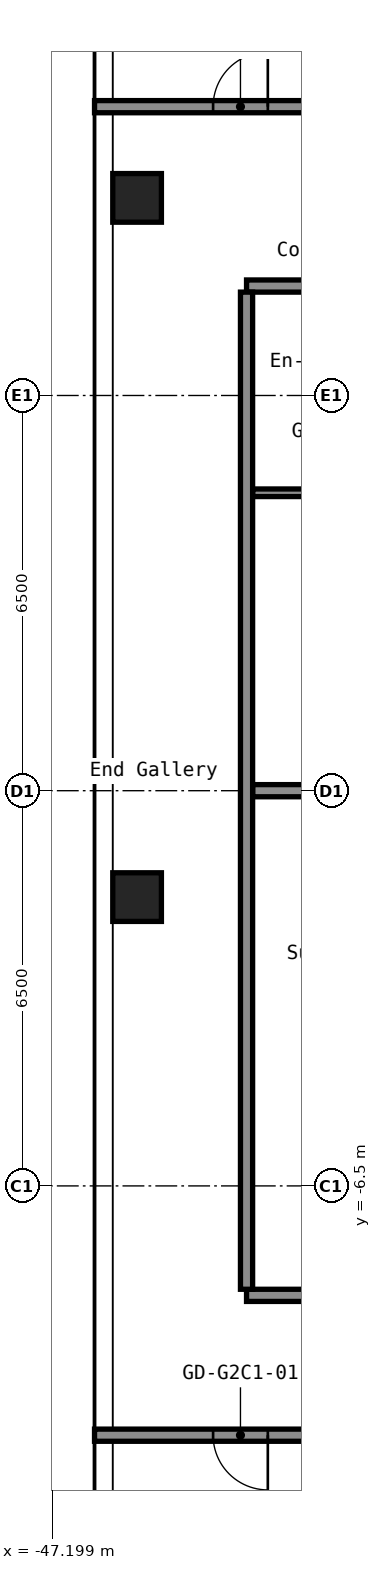
"""IFC4 building model, lengths in metres.
Left out: names, types, materials, properties, quantities, classifications, styles, units other than length and angle.
Written with IfcOpenShell. Run it as: python <this file> out.ifc"""

import sys

from ifc_helpers import new_model, si_unit, direction, frame, frame_2d, origin, origin_2d, place, context, subcontext, project, spatial, rectangle, hollow_rectangle, extrude, element, fill, save


model = new_model("IFC4")
c1 = context("Model", 3, precision=1e-05, world=origin(), true_north=direction((0.0, 1.0)))
c2 = subcontext(c1, "Body", "Model", "MODEL_VIEW")
j1 = project(units=[si_unit("LENGTHUNIT", "METRE"), si_unit("PLANEANGLEUNIT", "RADIAN")], contexts=[c1])
p1 = place(None, origin())
s1 = spatial("IfcSite", under=j1, at=p1, CompositionType="ELEMENT")
p2 = place(p1, origin())
s2 = spatial("IfcBuilding", under=s1, at=p2, CompositionType="ELEMENT")
p3 = place(p2, frame((0.0, 0.0, 97.8)))
s3 = spatial("IfcBuildingStorey", under=s2, at=p3, CompositionType="ELEMENT", Elevation=97.8)
for number, where, z_axis, x_axis in (
    (1, (-45.8, -1.75, 0.0), (0.0, 0.0, 1.0), (1.0, 0.0, 0.0)),
    (2, (-45.8, 9.75, 0.0), (0.0, 0.0, 1.0), (1.0, 0.0, 0.0)),
):
    element("IfcColumn", number, at=place(p3, frame(where, z_axis=z_axis, x_axis=x_axis)), inside=s3, PredefinedType="COLUMN", context=c2, shape_type="SweptSolid", body=[
        extrude(hollow_rectangle(XDim=0.8, YDim=0.8, WallThickness=0.032, at=origin_2d()), origin(), (0.0, 0.0, 1.0), 2.8),
    ])
p4 = place(p3, frame((-46.5, -10.6, 0.0), z_axis=(0.0, 0.0, 1.0), x_axis=(1.0, 0.0, 0.0)))
e3 = element("IfcWall", 3, at=p4, inside=s3, PredefinedType="PARTITIONING", context=c2, shape_type="SweptSolid", body=[
    extrude(rectangle(XDim=29.7, YDim=0.2, at=frame_2d((14.85, 0.0))), origin(), (0.0, 0.0, 1.0), 2.8),
])
p5 = place(p4, frame((1.95, 0.0, 0.0)))
e4 = element("IfcOpeningElement", 4, at=p5, cuts=e3, PredefinedType="OPENING", context=c2, shape_type="SweptSolid", body=[
    extrude(rectangle(XDim=0.9, YDim=2.1, at=frame_2d((0.45, 1.05))), frame((0.0, 0.11, 0.0), z_axis=(0.0, -1.0, 0.0), x_axis=(1.0, 0.0, 0.0)), (0.0, 0.0, 1.0), 0.22),
])
p6 = place(p4, frame((5.815, 0.0, 0.0)))
e5 = element("IfcOpeningElement", 5, at=p6, cuts=e3, PredefinedType="OPENING", context=c2, shape_type="SweptSolid", body=[
    extrude(rectangle(XDim=0.9, YDim=2.1, at=frame_2d((0.45, 1.05))), frame((0.0, 0.11, 0.0), z_axis=(0.0, -1.0, 0.0), x_axis=(1.0, 0.0, 0.0)), (0.0, 0.0, 1.0), 0.22),
])
p7 = place(p4, frame((10.015, 0.0, 0.0)))
e6 = element("IfcOpeningElement", 6, at=p7, cuts=e3, PredefinedType="OPENING", context=c2, shape_type="SweptSolid", body=[
    extrude(rectangle(XDim=0.9, YDim=2.1, at=frame_2d((0.45, 1.05))), frame((0.0, 0.11, 0.0), z_axis=(0.0, -1.0, 0.0), x_axis=(1.0, 0.0, 0.0)), (0.0, 0.0, 1.0), 0.22),
])
p8 = place(p4, frame((14.045, 0.0, 0.0)))
e7 = element("IfcOpeningElement", 7, at=p8, cuts=e3, PredefinedType="OPENING", context=c2, shape_type="SweptSolid", body=[
    extrude(rectangle(XDim=0.9, YDim=2.1, at=frame_2d((0.45, 1.05))), frame((0.0, 0.11, 0.0), z_axis=(0.0, -1.0, 0.0), x_axis=(1.0, 0.0, 0.0)), (0.0, 0.0, 1.0), 0.22),
])
p9 = place(p4, frame((18.245, 0.0, 0.0)))
e8 = element("IfcOpeningElement", 8, at=p9, cuts=e3, PredefinedType="OPENING", context=c2, shape_type="SweptSolid", body=[
    extrude(rectangle(XDim=0.9, YDim=2.1, at=frame_2d((0.45, 1.05))), frame((0.0, 0.11, 0.0), z_axis=(0.0, -1.0, 0.0), x_axis=(1.0, 0.0, 0.0)), (0.0, 0.0, 1.0), 0.22),
])
p10 = place(p4, frame((22.63, 0.0, 0.0)))
e9 = element("IfcOpeningElement", 9, at=p10, cuts=e3, PredefinedType="OPENING", context=c2, shape_type="SweptSolid", body=[
    extrude(rectangle(XDim=0.9, YDim=2.1, at=frame_2d((0.45, 1.05))), frame((0.0, 0.11, 0.0), z_axis=(0.0, -1.0, 0.0), x_axis=(1.0, 0.0, 0.0)), (0.0, 0.0, 1.0), 0.22),
])
p11 = place(p4, frame((26.83, 0.0, 0.0)))
e10 = element("IfcOpeningElement", 10, at=p11, cuts=e3, PredefinedType="OPENING", context=c2, shape_type="SweptSolid", body=[
    extrude(rectangle(XDim=0.9, YDim=2.1, at=frame_2d((0.45, 1.05))), frame((0.0, 0.11, 0.0), z_axis=(0.0, -1.0, 0.0), x_axis=(1.0, 0.0, 0.0)), (0.0, 0.0, 1.0), 0.22),
])
p12 = place(p3, frame((-44.0, -8.3, 0.0), z_axis=(0.0, 0.0, 1.0), x_axis=(1.0, 0.0, 0.0)))
e11 = element("IfcWall", 11, at=p12, inside=s3, PredefinedType="PARTITIONING", context=c2, shape_type="SweptSolid", body=[
    extrude(rectangle(XDim=10.4, YDim=0.2, at=frame_2d((5.2, 0.0))), origin(), (0.0, 0.0, 1.0), 2.8),
])
p13 = place(p12, frame((2.1, 0.0, 0.0)))
e12 = element("IfcOpeningElement", 12, at=p13, cuts=e11, PredefinedType="OPENING", context=c2, shape_type="SweptSolid", body=[
    extrude(rectangle(XDim=1.0, YDim=2.1, at=frame_2d((0.5, 1.05))), frame((0.0, 0.11, 0.0), z_axis=(0.0, -1.0, 0.0), x_axis=(1.0, 0.0, 0.0)), (0.0, 0.0, 1.0), 0.22),
])
p14 = place(p3, frame((-43.9, 0.0, 0.0), z_axis=(0.0, 0.0, 1.0), x_axis=(1.0, 0.0, 0.0)))
e13 = element("IfcWall", 13, at=p14, inside=s3, PredefinedType="PARTITIONING", context=c2, shape_type="SweptSolid", body=[
    extrude(rectangle(XDim=10.3, YDim=0.2, at=frame_2d((5.15, 0.0))), origin(), (0.0, 0.0, 1.0), 2.8),
])
p15 = place(p3, frame((-43.9, 4.9, 0.0), z_axis=(0.0, 0.0, 1.0), x_axis=(1.0, 0.0, 0.0)))
e14 = element("IfcWall", 14, at=p15, inside=s3, PredefinedType="PARTITIONING", context=c2, shape_type="SweptSolid", body=[
    extrude(rectangle(XDim=3.237, YDim=0.125, at=frame_2d((1.619, 0.0))), origin(), (0.0, 0.0, 1.0), 2.8),
])
p16 = place(p15, frame((1.2, 0.0, 0.0)))
e15 = element("IfcOpeningElement", 15, at=p16, cuts=e14, PredefinedType="OPENING", context=c2, shape_type="SweptSolid", body=[
    extrude(rectangle(XDim=0.8, YDim=2.1, at=frame_2d((0.4, 1.05))), frame((0.0, 0.073, 0.0), z_axis=(0.0, -1.0, 0.0), x_axis=(1.0, 0.0, 0.0)), (0.0, 0.0, 1.0), 0.145),
])
p17 = place(p3, frame((-44.0, 8.3, 0.0), z_axis=(0.0, 0.0, 1.0), x_axis=(1.0, 0.0, 0.0)))
e16 = element("IfcWall", 16, at=p17, inside=s3, PredefinedType="PARTITIONING", context=c2, shape_type="SweptSolid", body=[
    extrude(rectangle(XDim=10.4, YDim=0.2, at=frame_2d((5.2, 0.0))), origin(), (0.0, 0.0, 1.0), 2.8),
])
p18 = place(p17, frame((6.35, 0.0, 0.0)))
e17 = element("IfcOpeningElement", 17, at=p18, cuts=e16, PredefinedType="OPENING", context=c2, shape_type="SweptSolid", body=[
    extrude(rectangle(XDim=1.0, YDim=2.1, at=frame_2d((0.5, 1.05))), frame((0.0, 0.11, 0.0), z_axis=(0.0, -1.0, 0.0), x_axis=(1.0, 0.0, 0.0)), (0.0, 0.0, 1.0), 0.22),
])
p19 = place(p3, frame((-46.5, 11.25, 0.0), z_axis=(0.0, 0.0, 1.0), x_axis=(1.0, 0.0, 0.0)))
e18 = element("IfcWall", 18, at=p19, inside=s3, PredefinedType="PARTITIONING", context=c2, shape_type="SweptSolid", body=[
    extrude(rectangle(XDim=29.7, YDim=0.2, at=frame_2d((14.85, 0.0))), origin(), (0.0, 0.0, 1.0), 2.8),
])
p20 = place(p19, frame((1.95, 0.0, 0.0)))
e19 = element("IfcOpeningElement", 19, at=p20, cuts=e18, PredefinedType="OPENING", context=c2, shape_type="SweptSolid", body=[
    extrude(rectangle(XDim=0.9, YDim=2.1, at=frame_2d((0.45, 1.05))), frame((0.0, 0.11, 0.0), z_axis=(0.0, -1.0, 0.0), x_axis=(1.0, 0.0, 0.0)), (0.0, 0.0, 1.0), 0.22),
])
p21 = place(p19, frame((7.35, 0.0, 0.0)))
e20 = element("IfcOpeningElement", 20, at=p21, cuts=e18, PredefinedType="OPENING", context=c2, shape_type="SweptSolid", body=[
    extrude(rectangle(XDim=1.0, YDim=2.1, at=frame_2d((0.5, 1.05))), frame((0.0, 0.11, 0.0), z_axis=(0.0, -1.0, 0.0), x_axis=(1.0, 0.0, 0.0)), (0.0, 0.0, 1.0), 0.22),
])
p22 = place(p19, frame((9.05, 0.0, 0.0)))
e21 = element("IfcOpeningElement", 21, at=p22, cuts=e18, PredefinedType="OPENING", context=c2, shape_type="SweptSolid", body=[
    extrude(rectangle(XDim=1.0, YDim=2.1, at=frame_2d((0.5, 1.05))), frame((0.0, 0.11, 0.0), z_axis=(0.0, -1.0, 0.0), x_axis=(1.0, 0.0, 0.0)), (0.0, 0.0, 1.0), 0.22),
])
p23 = place(p19, frame((14.9, 0.0, 0.0)))
e22 = element("IfcOpeningElement", 22, at=p23, cuts=e18, PredefinedType="OPENING", context=c2, shape_type="SweptSolid", body=[
    extrude(rectangle(XDim=1.0, YDim=2.1, at=frame_2d((0.5, 1.05))), frame((0.0, 0.11, 0.0), z_axis=(0.0, -1.0, 0.0), x_axis=(1.0, 0.0, 0.0)), (0.0, 0.0, 1.0), 0.22),
])
p24 = place(p19, frame((24.15, 0.0, 0.0)))
e23 = element("IfcOpeningElement", 23, at=p24, cuts=e18, PredefinedType="OPENING", context=c2, shape_type="SweptSolid", body=[
    extrude(rectangle(XDim=1.0, YDim=2.1, at=frame_2d((0.5, 1.05))), frame((0.0, 0.11, 0.0), z_axis=(0.0, -1.0, 0.0), x_axis=(1.0, 0.0, 0.0)), (0.0, 0.0, 1.0), 0.22),
])
p25 = place(p19, frame((25.85, 0.0, 0.0)))
e24 = element("IfcOpeningElement", 24, at=p25, cuts=e18, PredefinedType="OPENING", context=c2, shape_type="SweptSolid", body=[
    extrude(rectangle(XDim=1.0, YDim=2.1, at=frame_2d((0.5, 1.05))), frame((0.0, 0.11, 0.0), z_axis=(0.0, -1.0, 0.0), x_axis=(1.0, 0.0, 0.0)), (0.0, 0.0, 1.0), 0.22),
])
p26 = place(p3, frame((-44.0, -8.2, 0.0), z_axis=(0.0, 0.0, 1.0), x_axis=(0.0, 1.0, 0.0)))
e25 = element("IfcWall", 25, at=p26, inside=s3, PredefinedType="PARTITIONING", context=c2, shape_type="SweptSolid", body=[
    extrude(rectangle(XDim=16.4, YDim=0.2, at=frame_2d((8.2, 0.0))), origin(), (0.0, 0.0, 1.0), 2.8),
])
p27 = place(p5, origin())
e26 = element("IfcDoor", 26, at=p27, inside=s3, OperationType="SINGLE_SWING_RIGHT", PredefinedType="DOOR", context=c2, shape_type="SweptSolid", body=[
    extrude(rectangle(XDim=0.9, YDim=2.1, at=frame_2d((0.45, 1.05))), frame((0.0, 0.025, 0.0), z_axis=(0.0, -1.0, 0.0), x_axis=(1.0, 0.0, 0.0)), (0.0, 0.0, 1.0), 0.05),
])
fill(e4, e26)
p28 = place(p20, origin())
e27 = element("IfcDoor", 27, at=p28, inside=s3, OperationType="SINGLE_SWING_LEFT", PredefinedType="DOOR", context=c2, shape_type="SweptSolid", body=[
    extrude(rectangle(XDim=0.9, YDim=2.1, at=frame_2d((0.45, 1.05))), frame((0.0, 0.025, 0.0), z_axis=(0.0, -1.0, 0.0), x_axis=(1.0, 0.0, 0.0)), (0.0, 0.0, 1.0), 0.05),
])
fill(e19, e27)
save(model, sys.argv[1])
